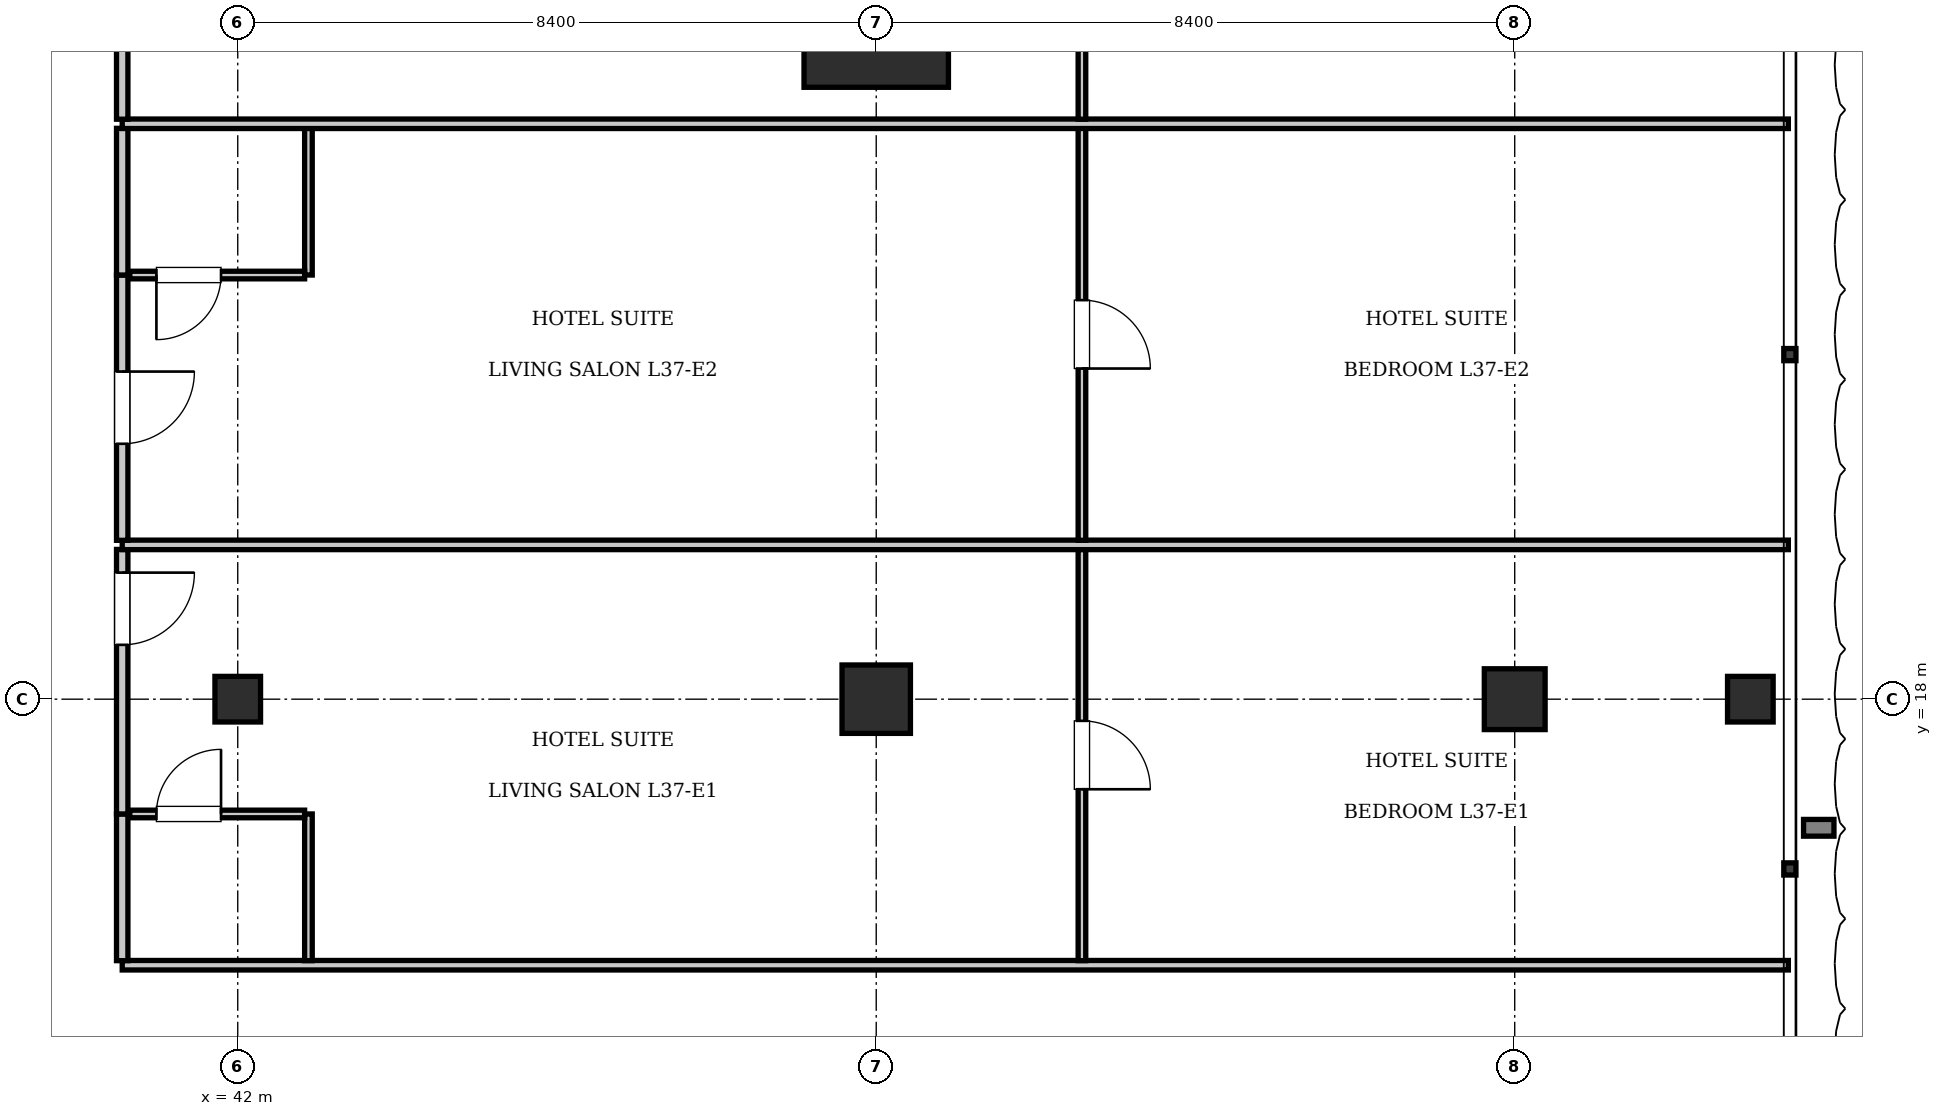
"""IFC4 building model, lengths in metres.
Left out: names, types, materials, properties, quantities, classifications, styles, units other than length and angle.
Written with IfcOpenShell. Run it as: python <this file> out.ifc"""

import sys

from ifc_helpers import new_model, si_unit, direction, frame, frame_2d, origin, origin_2d, place, context, subcontext, project, spatial, rectangle, i_section, extrude, element, fill, save


model = new_model("IFC4")
c1 = context("Model", 3, precision=1e-05, world=origin(), true_north=direction((0.0, 1.0)))
c2 = subcontext(c1, "Body", "Model", "MODEL_VIEW")
j1 = project(units=[si_unit("LENGTHUNIT", "METRE"), si_unit("PLANEANGLEUNIT", "RADIAN")], contexts=[c1])
p1 = place(None, origin())
s1 = spatial("IfcSite", under=j1, at=p1, CompositionType="ELEMENT")
p2 = place(p1, origin())
s2 = spatial("IfcBuilding", under=s1, at=p2, CompositionType="ELEMENT")
p3 = place(p2, frame((0.0, 0.0, 154.35)))
s3 = spatial("IfcBuildingStorey", under=s2, at=p3, CompositionType="ELEMENT", Elevation=154.35)
p4 = place(p3, frame((50.4, 27.0, 0.0), z_axis=(0.0, 0.0, 1.0), x_axis=(1.0, 0.0, 0.0)))
e1 = element("IfcColumn", 1, at=p4, inside=s3, PredefinedType="COLUMN", context=c2, shape_type="SweptSolid", body=[
    extrude(rectangle(XDim=1.9, YDim=1.9, at=origin_2d()), origin(), (0.0, 0.0, 1.0), 3.85),
])
p5 = place(p3, frame((50.4, 18.0, 0.0), z_axis=(0.0, 0.0, 1.0), x_axis=(1.0, 0.0, 0.0)))
e2 = element("IfcColumn", 2, at=p5, inside=s3, PredefinedType="COLUMN", context=c2, shape_type="SweptSolid", body=[
    extrude(rectangle(XDim=0.9, YDim=0.9, at=origin_2d()), origin(), (0.0, 0.0, 1.0), 3.85),
])
p6 = place(p3, frame((42.0, 18.0, 0.0), z_axis=(0.0, 0.0, 1.0), x_axis=(1.0, 0.0, 0.0)))
e3 = element("IfcColumn", 3, at=p6, inside=s3, PredefinedType="COLUMN", context=c2, shape_type="SweptSolid", body=[
    extrude(i_section(OverallWidth=0.6, OverallDepth=0.6, WebThickness=0.025, FlangeThickness=0.038, at=origin_2d()), origin(), (0.0, 0.0, 1.0), 3.85),
])
p7 = place(p3, frame((58.8, 18.0, 0.0), z_axis=(0.0, 0.0, 1.0), x_axis=(1.0, 0.0, 0.0)))
e4 = element("IfcColumn", 4, at=p7, inside=s3, PredefinedType="COLUMN", context=c2, shape_type="SweptSolid", body=[
    extrude(rectangle(XDim=0.8, YDim=0.8, at=origin_2d()), origin(), (0.0, 0.0, 1.0), 3.85),
])
p8 = place(p3, frame((61.9, 18.0, 0.0), z_axis=(0.0, 0.0, 1.0), x_axis=(1.0, 0.0, 0.0)))
e5 = element("IfcColumn", 5, at=p8, inside=s3, PredefinedType="COLUMN", context=c2, shape_type="SweptSolid", body=[
    extrude(i_section(OverallWidth=0.6, OverallDepth=0.6, WebThickness=0.025, FlangeThickness=0.038, at=origin_2d()), origin(), (0.0, 0.0, 1.0), 3.85),
])
p9 = place(p3, frame((40.48, 14.5, 0.0), z_axis=(0.0, 0.0, 1.0), x_axis=(1.0, 0.0, 0.0)))
e6 = element("IfcWall", 6, at=p9, inside=s3, PredefinedType="PARTITIONING", context=c2, shape_type="SweptSolid", body=[
    extrude(rectangle(XDim=21.92, YDim=0.125, at=frame_2d((10.96, 0.0))), origin(), (0.0, 0.0, 1.0), 3.61),
])
p10 = place(p3, frame((40.48, 14.56, 0.0), z_axis=(0.0, 0.0, 1.0), x_axis=(0.0, 1.0, 0.0)))
e7 = element("IfcWall", 7, at=p10, inside=s3, PredefinedType="PARTITIONING", context=c2, shape_type="SweptSolid", body=[
    extrude(rectangle(XDim=1.93, YDim=0.15, at=frame_2d((0.965, 0.0))), origin(), (0.0, 0.0, 1.0), 3.61),
])
p11 = place(p3, frame((40.48, 16.49, 0.0), z_axis=(0.0, 0.0, 1.0), x_axis=(0.0, 1.0, 0.0)))
e8 = element("IfcWall", 8, at=p11, inside=s3, PredefinedType="PARTITIONING", context=c2, shape_type="SweptSolid", body=[
    extrude(rectangle(XDim=3.48, YDim=0.15, at=frame_2d((1.74, 0.0))), origin(), (0.0, 0.0, 1.0), 3.61),
])
p12 = place(p11, frame((2.225, 0.0, 0.0)))
e9 = element("IfcOpeningElement", 9, at=p12, cuts=e8, PredefinedType="OPENING", context=c2, shape_type="SweptSolid", body=[
    extrude(rectangle(XDim=0.95, YDim=2.15, at=frame_2d((0.475, 1.075))), frame((0.0, 0.085, 0.0), z_axis=(0.0, -1.0, 0.0), x_axis=(1.0, 0.0, 0.0)), (0.0, 0.0, 1.0), 0.17),
])
p13 = place(p3, frame((42.93, 14.56, 0.0), z_axis=(0.0, 0.0, 1.0), x_axis=(0.0, 1.0, 0.0)))
e10 = element("IfcWall", 10, at=p13, inside=s3, PredefinedType="PARTITIONING", context=c2, shape_type="SweptSolid", body=[
    extrude(rectangle(XDim=1.93, YDim=0.1, at=frame_2d((0.965, 0.0))), origin(), (0.0, 0.0, 1.0), 3.61),
])
p14 = place(p3, frame((40.58, 16.49, 0.0), z_axis=(0.0, 0.0, 1.0), x_axis=(1.0, 0.0, 0.0)))
e11 = element("IfcWall", 11, at=p14, inside=s3, PredefinedType="PARTITIONING", context=c2, shape_type="SweptSolid", body=[
    extrude(rectangle(XDim=2.3, YDim=0.1, at=frame_2d((1.15, 0.0))), origin(), (0.0, 0.0, 1.0), 3.61),
])
p15 = place(p14, frame((0.35, 0.0, 0.0)))
e12 = element("IfcOpeningElement", 12, at=p15, cuts=e11, PredefinedType="OPENING", context=c2, shape_type="SweptSolid", body=[
    extrude(rectangle(XDim=0.85, YDim=2.1, at=frame_2d((0.425, 1.05))), frame((0.0, 0.06, 0.0), z_axis=(0.0, -1.0, 0.0), x_axis=(1.0, 0.0, 0.0)), (0.0, 0.0, 1.0), 0.12),
])
p16 = place(p3, frame((53.106, 14.56, 0.0), z_axis=(0.0, 0.0, 1.0), x_axis=(0.0, 1.0, 0.0)))
e13 = element("IfcWall", 13, at=p16, inside=s3, PredefinedType="PARTITIONING", context=c2, shape_type="SweptSolid", body=[
    extrude(rectangle(XDim=5.41, YDim=0.1, at=frame_2d((2.705, 0.0))), origin(), (0.0, 0.0, 1.0), 3.61),
])
p17 = place(p16, frame((2.255, 0.0, 0.0)))
e14 = element("IfcOpeningElement", 14, at=p17, cuts=e13, PredefinedType="OPENING", context=c2, shape_type="SweptSolid", body=[
    extrude(rectangle(XDim=0.9, YDim=2.1, at=frame_2d((0.45, 1.05))), frame((0.0, 0.06, 0.0), z_axis=(0.0, -1.0, 0.0), x_axis=(1.0, 0.0, 0.0)), (0.0, 0.0, 1.0), 0.12),
])
p18 = place(p3, frame((40.48, 20.03, 0.0), z_axis=(0.0, 0.0, 1.0), x_axis=(1.0, 0.0, 0.0)))
e15 = element("IfcWall", 15, at=p18, inside=s3, PredefinedType="PARTITIONING", context=c2, shape_type="SweptSolid", body=[
    extrude(rectangle(XDim=21.92, YDim=0.125, at=frame_2d((10.96, 0.0))), origin(), (0.0, 0.0, 1.0), 3.61),
])
p19 = place(p3, frame((40.48, 20.09, 0.0), z_axis=(0.0, 0.0, 1.0), x_axis=(0.0, 1.0, 0.0)))
e16 = element("IfcWall", 16, at=p19, inside=s3, PredefinedType="PARTITIONING", context=c2, shape_type="SweptSolid", body=[
    extrude(rectangle(XDim=3.49, YDim=0.15, at=frame_2d((1.745, 0.0))), origin(), (0.0, 0.0, 1.0), 3.61),
])
p20 = place(p19, frame((1.27, 0.0, 0.0)))
e17 = element("IfcOpeningElement", 17, at=p20, cuts=e16, PredefinedType="OPENING", context=c2, shape_type="SweptSolid", body=[
    extrude(rectangle(XDim=0.95, YDim=2.15, at=frame_2d((0.475, 1.075))), frame((0.0, 0.085, 0.0), z_axis=(0.0, -1.0, 0.0), x_axis=(1.0, 0.0, 0.0)), (0.0, 0.0, 1.0), 0.17),
])
p21 = place(p3, frame((40.48, 23.58, 0.0), z_axis=(0.0, 0.0, 1.0), x_axis=(0.0, 1.0, 0.0)))
e18 = element("IfcWall", 18, at=p21, inside=s3, PredefinedType="PARTITIONING", context=c2, shape_type="SweptSolid", body=[
    extrude(rectangle(XDim=1.93, YDim=0.15, at=frame_2d((0.965, 0.0))), origin(), (0.0, 0.0, 1.0), 3.61),
])
p22 = place(p3, frame((42.93, 23.58, 0.0), z_axis=(0.0, 0.0, 1.0), x_axis=(0.0, 1.0, 0.0)))
e19 = element("IfcWall", 19, at=p22, inside=s3, PredefinedType="PARTITIONING", context=c2, shape_type="SweptSolid", body=[
    extrude(rectangle(XDim=1.93, YDim=0.1, at=frame_2d((0.965, 0.0))), origin(), (0.0, 0.0, 1.0), 3.61),
])
p23 = place(p3, frame((40.58, 23.58, 0.0), z_axis=(0.0, 0.0, 1.0), x_axis=(1.0, 0.0, 0.0)))
e20 = element("IfcWall", 20, at=p23, inside=s3, PredefinedType="PARTITIONING", context=c2, shape_type="SweptSolid", body=[
    extrude(rectangle(XDim=2.3, YDim=0.1, at=frame_2d((1.15, 0.0))), origin(), (0.0, 0.0, 1.0), 3.61),
])
p24 = place(p23, frame((0.35, 0.0, 0.0)))
e21 = element("IfcOpeningElement", 21, at=p24, cuts=e20, PredefinedType="OPENING", context=c2, shape_type="SweptSolid", body=[
    extrude(rectangle(XDim=0.85, YDim=2.1, at=frame_2d((0.425, 1.05))), frame((0.0, 0.06, 0.0), z_axis=(0.0, -1.0, 0.0), x_axis=(1.0, 0.0, 0.0)), (0.0, 0.0, 1.0), 0.12),
])
p25 = place(p3, frame((53.106, 20.09, 0.0), z_axis=(0.0, 0.0, 1.0), x_axis=(0.0, 1.0, 0.0)))
e22 = element("IfcWall", 22, at=p25, inside=s3, PredefinedType="PARTITIONING", context=c2, shape_type="SweptSolid", body=[
    extrude(rectangle(XDim=5.42, YDim=0.1, at=frame_2d((2.71, 0.0))), origin(), (0.0, 0.0, 1.0), 3.61),
])
p26 = place(p25, frame((2.26, 0.0, 0.0)))
e23 = element("IfcOpeningElement", 23, at=p26, cuts=e22, PredefinedType="OPENING", context=c2, shape_type="SweptSolid", body=[
    extrude(rectangle(XDim=0.9, YDim=2.1, at=frame_2d((0.45, 1.05))), frame((0.0, 0.06, 0.0), z_axis=(0.0, -1.0, 0.0), x_axis=(1.0, 0.0, 0.0)), (0.0, 0.0, 1.0), 0.12),
])
p27 = place(p3, frame((40.48, 25.57, 0.0), z_axis=(0.0, 0.0, 1.0), x_axis=(1.0, 0.0, 0.0)))
e24 = element("IfcWall", 24, at=p27, inside=s3, PredefinedType="PARTITIONING", context=c2, shape_type="SweptSolid", body=[
    extrude(rectangle(XDim=21.92, YDim=0.125, at=frame_2d((10.96, 0.0))), origin(), (0.0, 0.0, 1.0), 3.61),
])
p28 = place(p3, frame((40.48, 25.63, 0.0), z_axis=(0.0, 0.0, 1.0), x_axis=(0.0, 1.0, 0.0)))
e25 = element("IfcWall", 25, at=p28, inside=s3, PredefinedType="PARTITIONING", context=c2, shape_type="SweptSolid", body=[
    extrude(rectangle(XDim=3.48, YDim=0.15, at=frame_2d((1.74, 0.0))), origin(), (0.0, 0.0, 1.0), 3.61),
])
p29 = place(p28, frame((1.265, 0.0, 0.0)))
e26 = element("IfcOpeningElement", 26, at=p29, cuts=e25, PredefinedType="OPENING", context=c2, shape_type="SweptSolid", body=[
    extrude(rectangle(XDim=0.95, YDim=2.15, at=frame_2d((0.475, 1.075))), frame((0.0, 0.085, 0.0), z_axis=(0.0, -1.0, 0.0), x_axis=(1.0, 0.0, 0.0)), (0.0, 0.0, 1.0), 0.17),
])
p30 = place(p3, frame((53.106, 25.63, 0.0), z_axis=(0.0, 0.0, 1.0), x_axis=(0.0, 1.0, 0.0)))
e27 = element("IfcWall", 27, at=p30, inside=s3, PredefinedType="PARTITIONING", context=c2, shape_type="SweptSolid", body=[
    extrude(rectangle(XDim=5.41, YDim=0.1, at=frame_2d((2.705, 0.0))), origin(), (0.0, 0.0, 1.0), 3.61),
])
p31 = place(p30, frame((2.255, 0.0, 0.0)))
e28 = element("IfcOpeningElement", 28, at=p31, cuts=e27, PredefinedType="OPENING", context=c2, shape_type="SweptSolid", body=[
    extrude(rectangle(XDim=0.9, YDim=2.1, at=frame_2d((0.45, 1.05))), frame((0.0, 0.06, 0.0), z_axis=(0.0, -1.0, 0.0), x_axis=(1.0, 0.0, 0.0)), (0.0, 0.0, 1.0), 0.12),
])
p32 = place(p15, origin())
e29 = element("IfcDoor", 29, at=p32, inside=s3, OperationType="SINGLE_SWING_RIGHT", PredefinedType="DOOR", context=c2, shape_type="SweptSolid", body=[
    extrude(rectangle(XDim=0.85, YDim=2.1, at=frame_2d((0.425, 1.05))), frame((0.0, 0.025, 0.0), z_axis=(0.0, -1.0, 0.0), x_axis=(1.0, 0.0, 0.0)), (0.0, 0.0, 1.0), 0.05),
])
fill(e12, e29)
p33 = place(p12, frame((0.95, 0.0, 0.0), z_axis=(0.0, 0.0, 1.0), x_axis=(-1.0, 0.0, 0.0)))
e30 = element("IfcDoor", 30, at=p33, inside=s3, OperationType="SINGLE_SWING_LEFT", PredefinedType="DOOR", context=c2, shape_type="SweptSolid", body=[
    extrude(rectangle(XDim=0.95, YDim=2.15, at=frame_2d((0.475, 1.075))), frame((0.0, 0.025, 0.0), z_axis=(0.0, -1.0, 0.0), x_axis=(1.0, 0.0, 0.0)), (0.0, 0.0, 1.0), 0.05),
])
fill(e9, e30)
p34 = place(p17, frame((0.9, 0.0, 0.0), z_axis=(0.0, 0.0, 1.0), x_axis=(-1.0, 0.0, 0.0)))
e31 = element("IfcDoor", 31, at=p34, inside=s3, OperationType="SINGLE_SWING_RIGHT", PredefinedType="DOOR", context=c2, shape_type="SweptSolid", body=[
    extrude(rectangle(XDim=0.9, YDim=2.1, at=frame_2d((0.45, 1.05))), frame((0.0, 0.025, 0.0), z_axis=(0.0, -1.0, 0.0), x_axis=(1.0, 0.0, 0.0)), (0.0, 0.0, 1.0), 0.05),
])
fill(e14, e31)
p35 = place(p24, frame((0.85, 0.0, 0.0), z_axis=(0.0, 0.0, 1.0), x_axis=(-1.0, 0.0, 0.0)))
e32 = element("IfcDoor", 32, at=p35, inside=s3, OperationType="SINGLE_SWING_RIGHT", PredefinedType="DOOR", context=c2, shape_type="SweptSolid", body=[
    extrude(rectangle(XDim=0.85, YDim=2.1, at=frame_2d((0.425, 1.05))), frame((0.0, 0.025, 0.0), z_axis=(0.0, -1.0, 0.0), x_axis=(1.0, 0.0, 0.0)), (0.0, 0.0, 1.0), 0.05),
])
fill(e21, e32)
p36 = place(p20, frame((0.95, 0.0, 0.0), z_axis=(0.0, 0.0, 1.0), x_axis=(-1.0, 0.0, 0.0)))
e33 = element("IfcDoor", 33, at=p36, inside=s3, OperationType="SINGLE_SWING_LEFT", PredefinedType="DOOR", context=c2, shape_type="SweptSolid", body=[
    extrude(rectangle(XDim=0.95, YDim=2.15, at=frame_2d((0.475, 1.075))), frame((0.0, 0.025, 0.0), z_axis=(0.0, -1.0, 0.0), x_axis=(1.0, 0.0, 0.0)), (0.0, 0.0, 1.0), 0.05),
])
fill(e17, e33)
p37 = place(p26, frame((0.9, 0.0, 0.0), z_axis=(0.0, 0.0, 1.0), x_axis=(-1.0, 0.0, 0.0)))
e34 = element("IfcDoor", 34, at=p37, inside=s3, OperationType="SINGLE_SWING_RIGHT", PredefinedType="DOOR", context=c2, shape_type="SweptSolid", body=[
    extrude(rectangle(XDim=0.9, YDim=2.1, at=frame_2d((0.45, 1.05))), frame((0.0, 0.025, 0.0), z_axis=(0.0, -1.0, 0.0), x_axis=(1.0, 0.0, 0.0)), (0.0, 0.0, 1.0), 0.05),
])
fill(e23, e34)
save(model, sys.argv[1])
